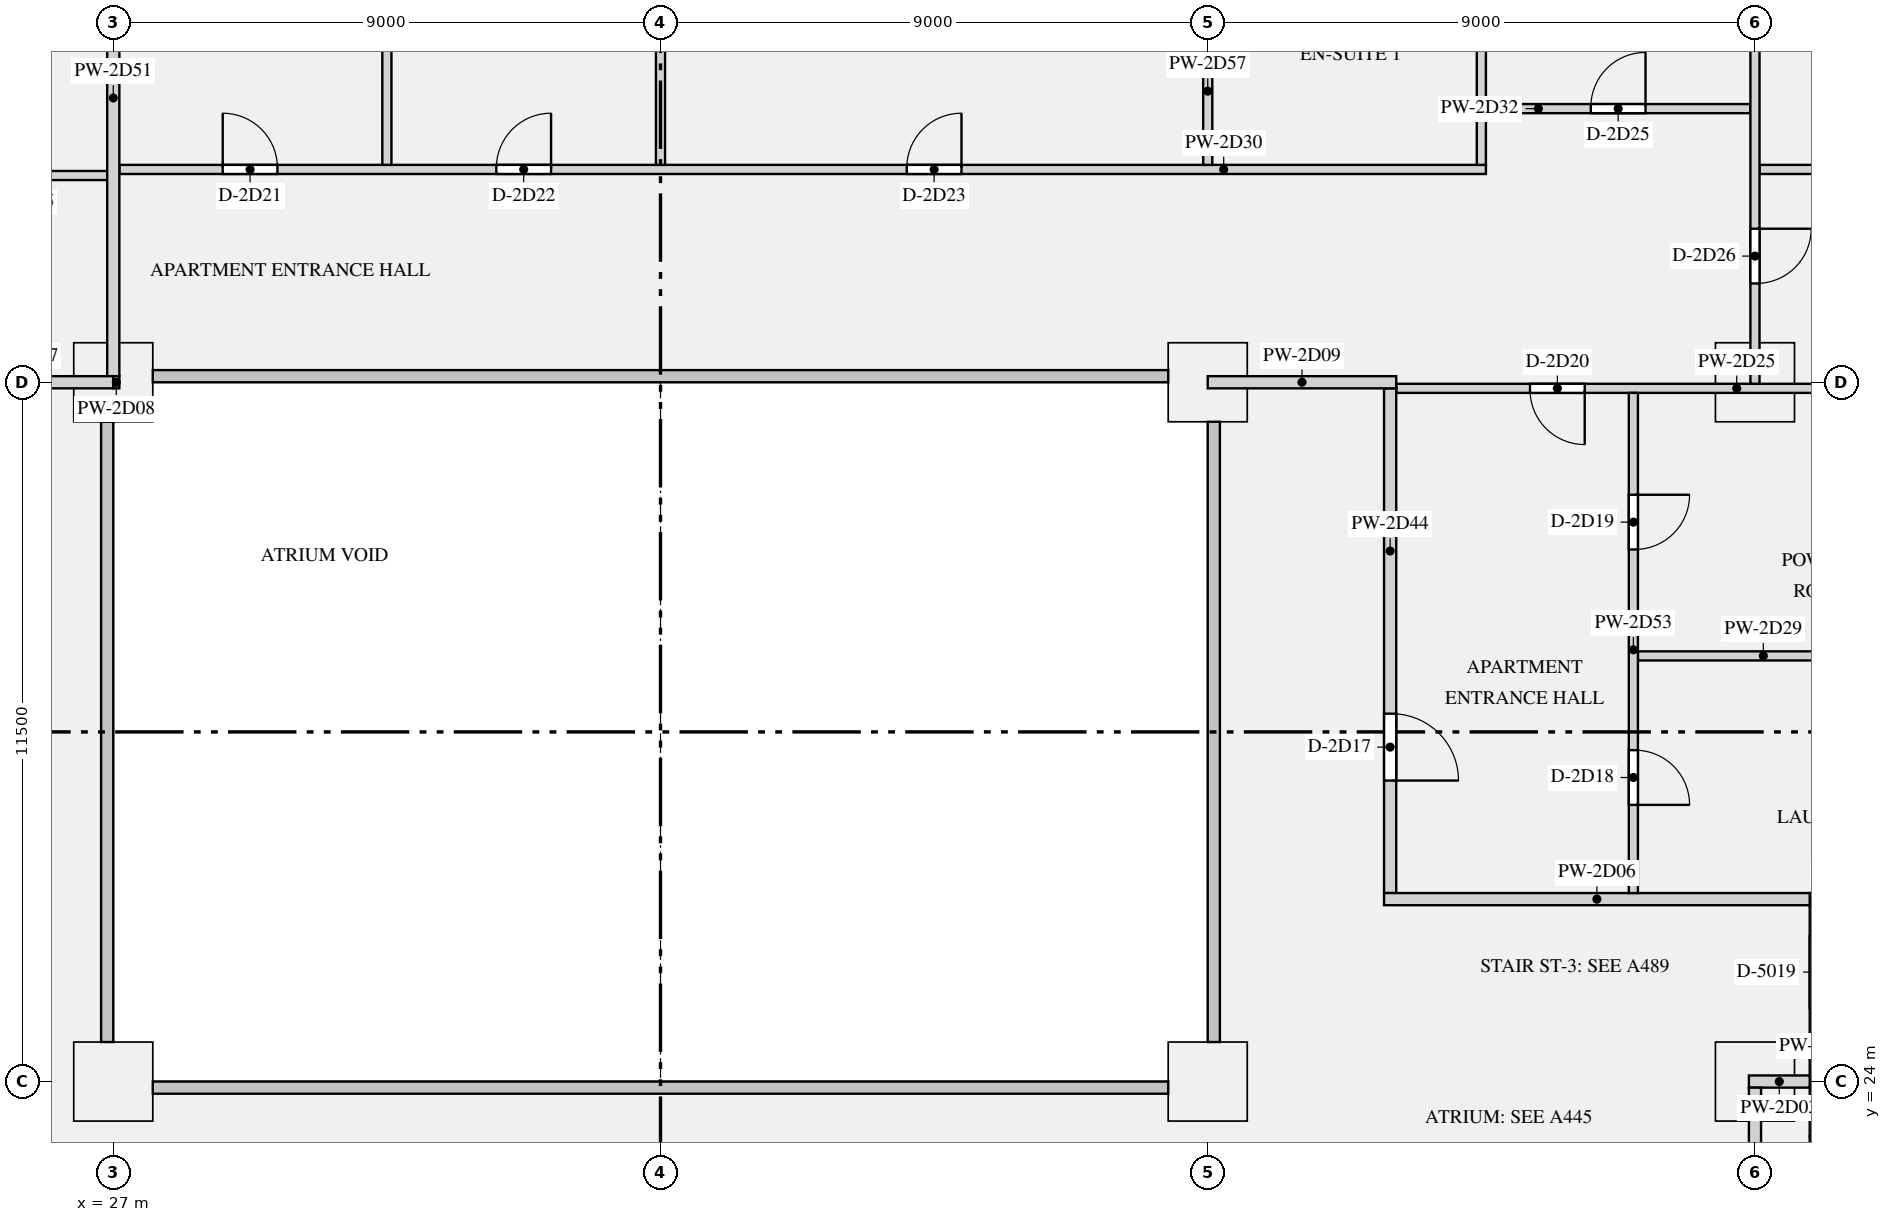
"""IFC4 building model, lengths in metres.
Left out: names, types, materials, properties, quantities, classifications, styles, units other than length and angle.
Written with IfcOpenShell. Run it as: python <this file> out.ifc"""

import sys

from ifc_helpers import new_model, si_unit, direction, frame, frame_2d, origin, origin_2d, place, context, subcontext, project, spatial, rectangle, extrude, element, fill, save


model = new_model("IFC4")
c1 = context("Model", 3, precision=1e-05, world=origin(), true_north=direction((0.0, 1.0)))
c2 = subcontext(c1, "Body", "Model", "MODEL_VIEW")
j1 = project(units=[si_unit("LENGTHUNIT", "METRE"), si_unit("PLANEANGLEUNIT", "RADIAN")], contexts=[c1])
p1 = place(None, origin())
s1 = spatial("IfcSite", under=j1, at=p1, CompositionType="ELEMENT")
p2 = place(p1, origin())
s2 = spatial("IfcBuilding", under=s1, at=p2, CompositionType="ELEMENT")
p3 = place(p2, frame((0.0, 0.0, 111.9)))
s3 = spatial("IfcBuildingStorey", under=s2, at=p3, CompositionType="ELEMENT", Elevation=111.9)
for number, where, z_axis, x_axis in (
    (1, (27.0, 24.0, 0.0), (0.0, 0.0, 1.0), (1.0, 0.0, 0.0)),
    (2, (45.0, 24.0, 0.0), (0.0, 0.0, 1.0), (1.0, 0.0, 0.0)),
    (3, (54.0, 24.0, 0.0), (0.0, 0.0, 1.0), (1.0, 0.0, 0.0)),
    (4, (27.0, 35.5, 0.0), (0.0, 0.0, 1.0), (1.0, 0.0, 0.0)),
    (5, (45.0, 35.5, 0.0), (0.0, 0.0, 1.0), (1.0, 0.0, 0.0)),
    (6, (54.0, 35.5, 0.0), (0.0, 0.0, 1.0), (1.0, 0.0, 0.0)),
):
    element("IfcColumn", number, at=place(p3, frame(where, z_axis=z_axis, x_axis=x_axis)), inside=s3, PredefinedType="COLUMN", context=c2, shape_type="SweptSolid", body=[
        extrude(rectangle(XDim=1.3, YDim=1.3, at=origin_2d()), origin(), (0.0, 0.0, 1.0), 3.15),
    ])
p4 = place(p3, frame((54.9, 23.0, 0.0), z_axis=(0.0, 0.0, 1.0), x_axis=(1.0, 0.0, 0.0)))
e7 = element("IfcWall", 7, at=p4, inside=s3, PredefinedType="PARTITIONING", context=c2, shape_type="SweptSolid", body=[
    extrude(rectangle(XDim=5.0, YDim=0.2, at=frame_2d((2.5, 0.0))), origin(), (0.0, 0.0, 1.0), 2.83),
])
p5 = place(p3, frame((54.9, 27.0, 0.0), z_axis=(0.0, 0.0, 1.0), x_axis=(1.0, 0.0, 0.0)))
e8 = element("IfcWall", 8, at=p5, inside=s3, PredefinedType="PARTITIONING", context=c2, shape_type="SweptSolid", body=[
    extrude(rectangle(XDim=1.3, YDim=0.2, at=frame_2d((0.65, 0.0))), origin(), (0.0, 0.0, 1.0), 2.83),
])
p6 = place(p3, frame((55.0, 23.1, 0.0), z_axis=(0.0, 0.0, 1.0), x_axis=(0.0, 1.0, 0.0)))
e9 = element("IfcWall", 9, at=p6, inside=s3, PredefinedType="PARTITIONING", context=c2, shape_type="SweptSolid", body=[
    extrude(rectangle(XDim=3.8, YDim=0.2, at=frame_2d((1.9, 0.0))), origin(), (0.0, 0.0, 1.0), 2.83),
])
p7 = place(p6, frame((2.1, 0.0, 0.0)))
e10 = element("IfcOpeningElement", 10, at=p7, cuts=e9, PredefinedType="OPENING", context=c2, shape_type="SweptSolid", body=[
    extrude(rectangle(XDim=1.2, YDim=2.1, at=frame_2d((0.6, 1.05))), frame((0.0, 0.11, 0.0), z_axis=(0.0, -1.0, 0.0), x_axis=(1.0, 0.0, 0.0)), (0.0, 0.0, 1.0), 0.22),
])
p8 = place(p3, frame((53.9, 24.0, 0.0), z_axis=(0.0, 0.0, 1.0), x_axis=(1.0, 0.0, 0.0)))
e11 = element("IfcWall", 11, at=p8, inside=s3, PredefinedType="PARTITIONING", context=c2, shape_type="SweptSolid", body=[
    extrude(rectangle(XDim=1.0, YDim=0.2, at=frame_2d((0.5, 0.0))), origin(), (0.0, 0.0, 1.0), 2.83),
])
p9 = place(p3, frame((47.9, 27.0, 0.0), z_axis=(0.0, 0.0, 1.0), x_axis=(1.0, 0.0, 0.0)))
e12 = element("IfcWall", 12, at=p9, inside=s3, PredefinedType="PARTITIONING", context=c2, shape_type="SweptSolid", body=[
    extrude(rectangle(XDim=7.0, YDim=0.2, at=frame_2d((3.5, 0.0))), origin(), (0.0, 0.0, 1.0), 2.83),
])
p10 = place(p3, frame((23.9, 35.5, 0.0), z_axis=(0.0, 0.0, 1.0), x_axis=(1.0, 0.0, 0.0)))
e13 = element("IfcWall", 13, at=p10, inside=s3, PredefinedType="PARTITIONING", context=c2, shape_type="SweptSolid", body=[
    extrude(rectangle(XDim=3.1, YDim=0.2, at=frame_2d((1.55, 0.0))), origin(), (0.0, 0.0, 1.0), 2.83),
])
p11 = place(p3, frame((27.0, 35.5, 0.0), z_axis=(0.0, 0.0, 1.0), x_axis=(1.0, 0.0, 0.0)))
e14 = element("IfcWall", 14, at=p11, inside=s3, PredefinedType="PARTITIONING", context=c2, shape_type="SweptSolid", body=[
    extrude(rectangle(XDim=0.1, YDim=0.2, at=frame_2d((0.05, 0.0))), origin(), (0.0, 0.0, 1.0), 2.83),
])
p12 = place(p3, frame((45.0, 35.5, 0.0), z_axis=(0.0, 0.0, 1.0), x_axis=(1.0, 0.0, 0.0)))
e15 = element("IfcWall", 15, at=p12, inside=s3, PredefinedType="PARTITIONING", context=c2, shape_type="SweptSolid", body=[
    extrude(rectangle(XDim=3.1, YDim=0.2, at=frame_2d((1.55, 0.0))), origin(), (0.0, 0.0, 1.0), 2.83),
])
p13 = place(p3, frame((13.425, 38.9, 0.0), z_axis=(0.0, 0.0, 1.0), x_axis=(1.0, 0.0, 0.0)))
e16 = element("IfcWall", 16, at=p13, inside=s3, PredefinedType="PARTITIONING", context=c2, shape_type="SweptSolid", body=[
    extrude(rectangle(XDim=13.475, YDim=0.15, at=frame_2d((6.737, 0.0))), origin(), (0.0, 0.0, 1.0), 2.83),
])
p14 = place(p13, frame((3.825, 0.0, 0.0)))
e17 = element("IfcOpeningElement", 17, at=p14, cuts=e16, PredefinedType="OPENING", context=c2, shape_type="SweptSolid", body=[
    extrude(rectangle(XDim=1.5, YDim=2.1, at=frame_2d((0.75, 1.05))), frame((0.0, 0.085, 0.0), z_axis=(0.0, -1.0, 0.0), x_axis=(1.0, 0.0, 0.0)), (0.0, 0.0, 1.0), 0.17),
])
p15 = place(p13, frame((11.625, 0.0, 0.0)))
e18 = element("IfcOpeningElement", 18, at=p15, cuts=e16, PredefinedType="OPENING", context=c2, shape_type="SweptSolid", body=[
    extrude(rectangle(XDim=0.9, YDim=2.1, at=frame_2d((0.45, 1.05))), frame((0.0, 0.085, 0.0), z_axis=(0.0, -1.0, 0.0), x_axis=(1.0, 0.0, 0.0)), (0.0, 0.0, 1.0), 0.17),
])
p16 = place(p3, frame((48.1, 35.4, 0.0), z_axis=(0.0, 0.0, 1.0), x_axis=(1.0, 0.0, 0.0)))
e19 = element("IfcWall", 19, at=p16, inside=s3, PredefinedType="PARTITIONING", context=c2, shape_type="SweptSolid", body=[
    extrude(rectangle(XDim=8.1, YDim=0.15, at=frame_2d((4.05, 0.0))), origin(), (0.0, 0.0, 1.0), 2.83),
])
p17 = place(p16, frame((2.2, 0.0, 0.0)))
e20 = element("IfcOpeningElement", 20, at=p17, cuts=e19, PredefinedType="OPENING", context=c2, shape_type="SweptSolid", body=[
    extrude(rectangle(XDim=0.9, YDim=2.1, at=frame_2d((0.45, 1.05))), frame((0.0, 0.085, 0.0), z_axis=(0.0, -1.0, 0.0), x_axis=(1.0, 0.0, 0.0)), (0.0, 0.0, 1.0), 0.17),
])
p18 = place(p3, frame((52.075, 31.0, 0.0), z_axis=(0.0, 0.0, 1.0), x_axis=(1.0, 0.0, 0.0)))
e21 = element("IfcWall", 21, at=p18, inside=s3, PredefinedType="PARTITIONING", context=c2, shape_type="SweptSolid", body=[
    extrude(rectangle(XDim=4.125, YDim=0.15, at=frame_2d((2.062, 0.0))), origin(), (0.0, 0.0, 1.0), 2.83),
])
p19 = place(p3, frame((27.1, 39.0, 0.0), z_axis=(0.0, 0.0, 1.0), x_axis=(1.0, 0.0, 0.0)))
e22 = element("IfcWall", 22, at=p19, inside=s3, PredefinedType="PARTITIONING", context=c2, shape_type="SweptSolid", body=[
    extrude(rectangle(XDim=22.475, YDim=0.15, at=frame_2d((11.237, 0.0))), origin(), (0.0, 0.0, 1.0), 2.83),
])
p20 = place(p19, frame((1.7, 0.0, 0.0)))
e23 = element("IfcOpeningElement", 23, at=p20, cuts=e22, PredefinedType="OPENING", context=c2, shape_type="SweptSolid", body=[
    extrude(rectangle(XDim=0.9, YDim=2.1, at=frame_2d((0.45, 1.05))), frame((0.0, 0.085, 0.0), z_axis=(0.0, -1.0, 0.0), x_axis=(1.0, 0.0, 0.0)), (0.0, 0.0, 1.0), 0.17),
])
p21 = place(p19, frame((6.2, 0.0, 0.0)))
e24 = element("IfcOpeningElement", 24, at=p21, cuts=e22, PredefinedType="OPENING", context=c2, shape_type="SweptSolid", body=[
    extrude(rectangle(XDim=0.9, YDim=2.1, at=frame_2d((0.45, 1.05))), frame((0.0, 0.085, 0.0), z_axis=(0.0, -1.0, 0.0), x_axis=(1.0, 0.0, 0.0)), (0.0, 0.0, 1.0), 0.17),
])
p22 = place(p19, frame((12.95, 0.0, 0.0)))
e25 = element("IfcOpeningElement", 25, at=p22, cuts=e22, PredefinedType="OPENING", context=c2, shape_type="SweptSolid", body=[
    extrude(rectangle(XDim=0.9, YDim=2.1, at=frame_2d((0.45, 1.05))), frame((0.0, 0.085, 0.0), z_axis=(0.0, -1.0, 0.0), x_axis=(1.0, 0.0, 0.0)), (0.0, 0.0, 1.0), 0.17),
])
p23 = place(p3, frame((54.075, 39.0, 0.0), z_axis=(0.0, 0.0, 1.0), x_axis=(1.0, 0.0, 0.0)))
e26 = element("IfcWall", 26, at=p23, inside=s3, PredefinedType="PARTITIONING", context=c2, shape_type="SweptSolid", body=[
    extrude(rectangle(XDim=8.85, YDim=0.15, at=frame_2d((4.425, 0.0))), origin(), (0.0, 0.0, 1.0), 2.83),
])
p24 = place(p23, frame((3.975, 0.0, 0.0)))
e27 = element("IfcOpeningElement", 27, at=p24, cuts=e26, PredefinedType="OPENING", context=c2, shape_type="SweptSolid", body=[
    extrude(rectangle(XDim=0.9, YDim=2.1, at=frame_2d((0.45, 1.05))), frame((0.0, 0.085, 0.0), z_axis=(0.0, -1.0, 0.0), x_axis=(1.0, 0.0, 0.0)), (0.0, 0.0, 1.0), 0.17),
])
p25 = place(p3, frame((49.575, 40.0, 0.0), z_axis=(0.0, 0.0, 1.0), x_axis=(1.0, 0.0, 0.0)))
e28 = element("IfcWall", 28, at=p25, inside=s3, PredefinedType="PARTITIONING", context=c2, shape_type="SweptSolid", body=[
    extrude(rectangle(XDim=4.35, YDim=0.15, at=frame_2d((2.175, 0.0))), origin(), (0.0, 0.0, 1.0), 2.83),
])
p26 = place(p25, frame((1.725, 0.0, 0.0)))
e29 = element("IfcOpeningElement", 29, at=p26, cuts=e28, PredefinedType="OPENING", context=c2, shape_type="SweptSolid", body=[
    extrude(rectangle(XDim=0.9, YDim=2.1, at=frame_2d((0.45, 1.05))), frame((0.0, 0.085, 0.0), z_axis=(0.0, -1.0, 0.0), x_axis=(1.0, 0.0, 0.0)), (0.0, 0.0, 1.0), 0.17),
])
p27 = place(p3, frame((54.0, 35.475, 0.0), z_axis=(0.0, 0.0, 1.0), x_axis=(0.0, 1.0, 0.0)))
e30 = element("IfcWall", 30, at=p27, inside=s3, PredefinedType="PARTITIONING", context=c2, shape_type="SweptSolid", body=[
    extrude(rectangle(XDim=9.275, YDim=0.15, at=frame_2d((4.637, 0.0))), origin(), (0.0, 0.0, 1.0), 2.83),
])
p28 = place(p27, frame((1.65, 0.0, 0.0)))
e31 = element("IfcOpeningElement", 31, at=p28, cuts=e30, PredefinedType="OPENING", context=c2, shape_type="SweptSolid", body=[
    extrude(rectangle(XDim=0.9, YDim=2.1, at=frame_2d((0.45, 1.05))), frame((0.0, 0.085, 0.0), z_axis=(0.0, -1.0, 0.0), x_axis=(1.0, 0.0, 0.0)), (0.0, 0.0, 1.0), 0.17),
])
p29 = place(p3, frame((54.0, 16.1, 0.0), z_axis=(0.0, 0.0, 1.0), x_axis=(0.0, 1.0, 0.0)))
e32 = element("IfcWall", 32, at=p29, inside=s3, PredefinedType="PARTITIONING", context=c2, shape_type="SweptSolid", body=[
    extrude(rectangle(XDim=7.8, YDim=0.2, at=frame_2d((3.9, 0.0))), origin(), (0.0, 0.0, 1.0), 2.83),
])
p30 = place(p29, frame((2.35, 0.0, 0.0)))
e33 = element("IfcOpeningElement", 33, at=p30, cuts=e32, PredefinedType="OPENING", context=c2, shape_type="SweptSolid", body=[
    extrude(rectangle(XDim=1.1, YDim=2.1, at=frame_2d((0.55, 1.05))), frame((0.0, 0.11, 0.0), z_axis=(0.0, -1.0, 0.0), x_axis=(1.0, 0.0, 0.0)), (0.0, 0.0, 1.0), 0.22),
])
p31 = place(p3, frame((48.0, 27.1, 0.0), z_axis=(0.0, 0.0, 1.0), x_axis=(0.0, 1.0, 0.0)))
e34 = element("IfcWall", 34, at=p31, inside=s3, PredefinedType="PARTITIONING", context=c2, shape_type="SweptSolid", body=[
    extrude(rectangle(XDim=8.3, YDim=0.2, at=frame_2d((4.15, 0.0))), origin(), (0.0, 0.0, 1.0), 2.83),
])
p32 = place(p31, frame((1.85, 0.0, 0.0)))
e35 = element("IfcOpeningElement", 35, at=p32, cuts=e34, PredefinedType="OPENING", context=c2, shape_type="SweptSolid", body=[
    extrude(rectangle(XDim=1.1, YDim=2.1, at=frame_2d((0.55, 1.05))), frame((0.0, 0.11, 0.0), z_axis=(0.0, -1.0, 0.0), x_axis=(1.0, 0.0, 0.0)), (0.0, 0.0, 1.0), 0.22),
])
p33 = place(p3, frame((27.0, 35.6, 0.0), z_axis=(0.0, 0.0, 1.0), x_axis=(0.0, 1.0, 0.0)))
e36 = element("IfcWall", 36, at=p33, inside=s3, PredefinedType="PARTITIONING", context=c2, shape_type="SweptSolid", body=[
    extrude(rectangle(XDim=9.15, YDim=0.2, at=frame_2d((4.575, 0.0))), origin(), (0.0, 0.0, 1.0), 2.83),
])
p34 = place(p3, frame((52.0, 27.1, 0.0), z_axis=(0.0, 0.0, 1.0), x_axis=(0.0, 1.0, 0.0)))
e37 = element("IfcWall", 37, at=p34, inside=s3, PredefinedType="PARTITIONING", context=c2, shape_type="SweptSolid", body=[
    extrude(rectangle(XDim=8.225, YDim=0.15, at=frame_2d((4.112, 0.0))), origin(), (0.0, 0.0, 1.0), 2.83),
])
p35 = place(p34, frame((1.45, 0.0, 0.0)))
e38 = element("IfcOpeningElement", 38, at=p35, cuts=e37, PredefinedType="OPENING", context=c2, shape_type="SweptSolid", body=[
    extrude(rectangle(XDim=0.9, YDim=2.1, at=frame_2d((0.45, 1.05))), frame((0.0, 0.085, 0.0), z_axis=(0.0, -1.0, 0.0), x_axis=(1.0, 0.0, 0.0)), (0.0, 0.0, 1.0), 0.17),
])
p36 = place(p34, frame((5.65, 0.0, 0.0)))
e39 = element("IfcOpeningElement", 39, at=p36, cuts=e37, PredefinedType="OPENING", context=c2, shape_type="SweptSolid", body=[
    extrude(rectangle(XDim=0.9, YDim=2.1, at=frame_2d((0.45, 1.05))), frame((0.0, 0.085, 0.0), z_axis=(0.0, -1.0, 0.0), x_axis=(1.0, 0.0, 0.0)), (0.0, 0.0, 1.0), 0.17),
])
for number, where, z_axis, x_axis in (
    (40, (49.5, 39.075, 0.0), (0.0, 0.0, 1.0), (0.0, 1.0, 0.0)),
    (41, (31.5, 39.075, 0.0), (0.0, 0.0, 1.0), (0.0, 1.0, 0.0)),
    (42, (36.0, 39.075, 0.0), (0.0, 0.0, 1.0), (0.0, 1.0, 0.0)),
):
    element("IfcWall", number, at=place(p3, frame(where, z_axis=z_axis, x_axis=x_axis)), inside=s3, PredefinedType="PARTITIONING", context=c2, shape_type="SweptSolid", body=[
        extrude(rectangle(XDim=5.675, YDim=0.15, at=frame_2d((2.837, 0.0))), origin(), (0.0, 0.0, 1.0), 2.83),
    ])
p37 = place(p3, frame((45.0, 39.075, 0.0), z_axis=(0.0, 0.0, 1.0), x_axis=(0.0, 1.0, 0.0)))
e43 = element("IfcWall", 43, at=p37, inside=s3, PredefinedType="PARTITIONING", context=c2, shape_type="SweptSolid", body=[
    extrude(rectangle(XDim=5.675, YDim=0.15, at=frame_2d((2.837, 0.0))), origin(), (0.0, 0.0, 1.0), 2.83),
])
p38 = place(p37, frame((2.425, 0.0, 0.0)))
e44 = element("IfcOpeningElement", 44, at=p38, cuts=e43, PredefinedType="OPENING", context=c2, shape_type="SweptSolid", body=[
    extrude(rectangle(XDim=0.9, YDim=2.1, at=frame_2d((0.45, 1.05))), frame((0.0, 0.085, 0.0), z_axis=(0.0, -1.0, 0.0), x_axis=(1.0, 0.0, 0.0)), (0.0, 0.0, 1.0), 0.17),
])
p39 = place(p32, frame((1.1, 0.0, 0.0), z_axis=(0.0, 0.0, 1.0), x_axis=(-1.0, 0.0, 0.0)))
e45 = element("IfcDoor", 45, at=p39, inside=s3, OperationType="SINGLE_SWING_RIGHT", PredefinedType="DOOR", context=c2, shape_type="SweptSolid", body=[
    extrude(rectangle(XDim=1.1, YDim=2.1, at=frame_2d((0.55, 1.05))), frame((0.0, 0.025, 0.0), z_axis=(0.0, -1.0, 0.0), x_axis=(1.0, 0.0, 0.0)), (0.0, 0.0, 1.0), 0.05),
])
fill(e35, e45)
p40 = place(p35, frame((0.9, 0.0, 0.0), z_axis=(0.0, 0.0, 1.0), x_axis=(-1.0, 0.0, 0.0)))
e46 = element("IfcDoor", 46, at=p40, inside=s3, OperationType="SINGLE_SWING_RIGHT", PredefinedType="DOOR", context=c2, shape_type="SweptSolid", body=[
    extrude(rectangle(XDim=0.9, YDim=2.1, at=frame_2d((0.45, 1.05))), frame((0.0, 0.025, 0.0), z_axis=(0.0, -1.0, 0.0), x_axis=(1.0, 0.0, 0.0)), (0.0, 0.0, 1.0), 0.05),
])
fill(e38, e46)
p41 = place(p36, frame((0.9, 0.0, 0.0), z_axis=(0.0, 0.0, 1.0), x_axis=(-1.0, 0.0, 0.0)))
e47 = element("IfcDoor", 47, at=p41, inside=s3, OperationType="SINGLE_SWING_LEFT", PredefinedType="DOOR", context=c2, shape_type="SweptSolid", body=[
    extrude(rectangle(XDim=0.9, YDim=2.1, at=frame_2d((0.45, 1.05))), frame((0.0, 0.025, 0.0), z_axis=(0.0, -1.0, 0.0), x_axis=(1.0, 0.0, 0.0)), (0.0, 0.0, 1.0), 0.05),
])
fill(e39, e47)
p42 = place(p17, frame((0.9, 0.0, 0.0), z_axis=(0.0, 0.0, 1.0), x_axis=(-1.0, 0.0, 0.0)))
e48 = element("IfcDoor", 48, at=p42, inside=s3, OperationType="SINGLE_SWING_LEFT", PredefinedType="DOOR", context=c2, shape_type="SweptSolid", body=[
    extrude(rectangle(XDim=0.9, YDim=2.1, at=frame_2d((0.45, 1.05))), frame((0.0, 0.025, 0.0), z_axis=(0.0, -1.0, 0.0), x_axis=(1.0, 0.0, 0.0)), (0.0, 0.0, 1.0), 0.05),
])
fill(e20, e48)
p43 = place(p20, origin())
e49 = element("IfcDoor", 49, at=p43, inside=s3, OperationType="SINGLE_SWING_LEFT", PredefinedType="DOOR", context=c2, shape_type="SweptSolid", body=[
    extrude(rectangle(XDim=0.9, YDim=2.1, at=frame_2d((0.45, 1.05))), frame((0.0, 0.025, 0.0), z_axis=(0.0, -1.0, 0.0), x_axis=(1.0, 0.0, 0.0)), (0.0, 0.0, 1.0), 0.05),
])
fill(e23, e49)
p44 = place(p21, origin())
e50 = element("IfcDoor", 50, at=p44, inside=s3, OperationType="SINGLE_SWING_RIGHT", PredefinedType="DOOR", context=c2, shape_type="SweptSolid", body=[
    extrude(rectangle(XDim=0.9, YDim=2.1, at=frame_2d((0.45, 1.05))), frame((0.0, 0.025, 0.0), z_axis=(0.0, -1.0, 0.0), x_axis=(1.0, 0.0, 0.0)), (0.0, 0.0, 1.0), 0.05),
])
fill(e24, e50)
p45 = place(p22, origin())
e51 = element("IfcDoor", 51, at=p45, inside=s3, OperationType="SINGLE_SWING_RIGHT", PredefinedType="DOOR", context=c2, shape_type="SweptSolid", body=[
    extrude(rectangle(XDim=0.9, YDim=2.1, at=frame_2d((0.45, 1.05))), frame((0.0, 0.025, 0.0), z_axis=(0.0, -1.0, 0.0), x_axis=(1.0, 0.0, 0.0)), (0.0, 0.0, 1.0), 0.05),
])
fill(e25, e51)
p46 = place(p26, origin())
e52 = element("IfcDoor", 52, at=p46, inside=s3, OperationType="SINGLE_SWING_RIGHT", PredefinedType="DOOR", context=c2, shape_type="SweptSolid", body=[
    extrude(rectangle(XDim=0.9, YDim=2.1, at=frame_2d((0.45, 1.05))), frame((0.0, 0.025, 0.0), z_axis=(0.0, -1.0, 0.0), x_axis=(1.0, 0.0, 0.0)), (0.0, 0.0, 1.0), 0.05),
])
fill(e29, e52)
p47 = place(p28, frame((0.9, 0.0, 0.0), z_axis=(0.0, 0.0, 1.0), x_axis=(-1.0, 0.0, 0.0)))
e53 = element("IfcDoor", 53, at=p47, inside=s3, OperationType="SINGLE_SWING_LEFT", PredefinedType="DOOR", context=c2, shape_type="SweptSolid", body=[
    extrude(rectangle(XDim=0.9, YDim=2.1, at=frame_2d((0.45, 1.05))), frame((0.0, 0.025, 0.0), z_axis=(0.0, -1.0, 0.0), x_axis=(1.0, 0.0, 0.0)), (0.0, 0.0, 1.0), 0.05),
])
fill(e31, e53)
save(model, sys.argv[1])
